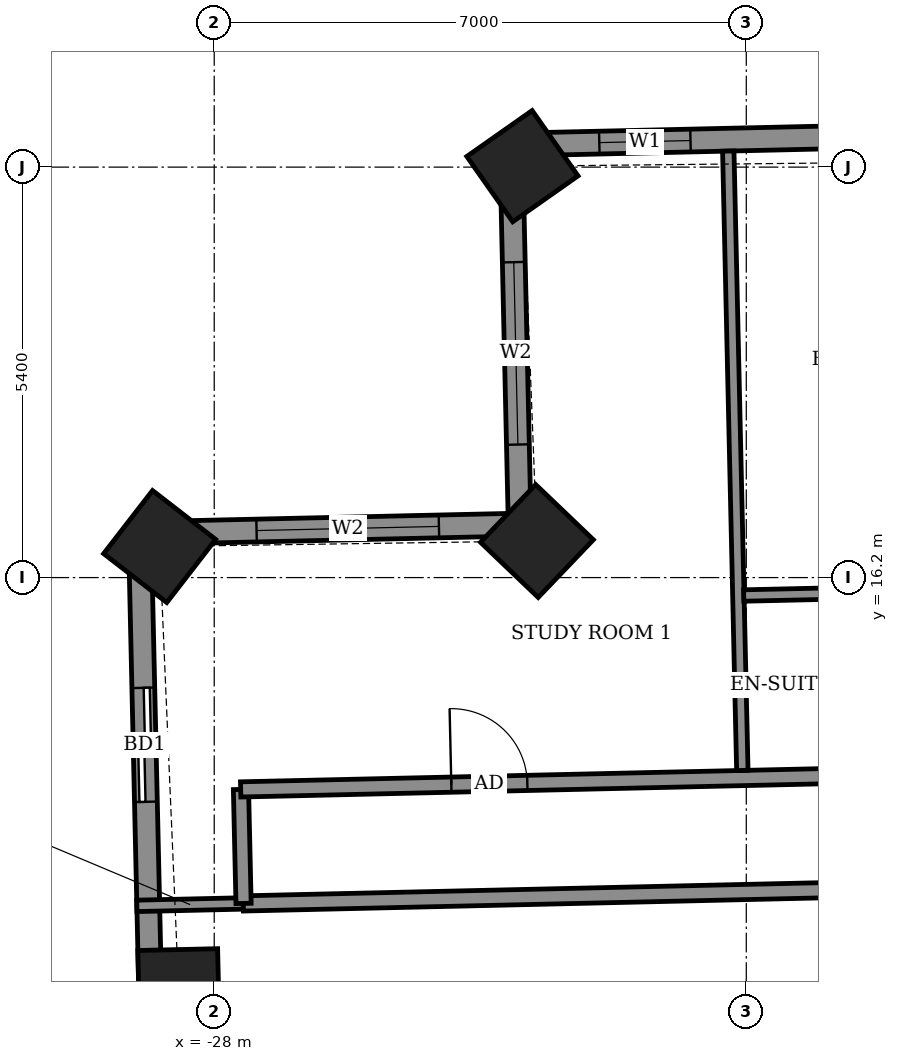
"""IFC4 building model, lengths in metres.
Left out: names, types, materials, properties, quantities, classifications, styles, units other than length and angle.
Written with IfcOpenShell. Run it as: python <this file> out.ifc"""

import sys

from ifc_helpers import new_model, si_unit, direction, frame, frame_2d, origin, origin_2d, place, context, subcontext, project, spatial, rectangle, extrude, element, fill, save


model = new_model("IFC4")
c1 = context("Model", 3, precision=1e-05, world=origin(), true_north=direction((0.0, 1.0)))
c2 = subcontext(c1, "Body", "Model", "MODEL_VIEW")
j1 = project(units=[si_unit("LENGTHUNIT", "METRE"), si_unit("PLANEANGLEUNIT", "RADIAN")], contexts=[c1])
p1 = place(None, origin())
s1 = spatial("IfcSite", under=j1, at=p1, CompositionType="ELEMENT")
p2 = place(p1, origin())
s2 = spatial("IfcBuilding", under=s1, at=p2, CompositionType="ELEMENT")
p3 = place(p2, frame((0.0, 0.0, 241.9)))
s3 = spatial("IfcBuildingStorey", under=s2, at=p3, CompositionType="ELEMENT", Elevation=241.9)
for number, where, z_axis, x_axis in (
    (1, (-23.945, 21.613, -0.55), (0.0, 0.0, 1.0), (-0.818, -0.575, 0.0)),
    (2, (-23.754, 16.681, -0.55), (0.0, 0.0, 1.0), (-0.691, -0.723, 0.0)),
    (3, (-28.718, 16.609, -0.55), (0.0, 0.0, 1.0), (-0.612, -0.791, 0.0)),
    (4, (-28.468, 10.781, -0.55), (0.0, 0.0, 1.0), (0.023, -1.0, 0.0)),
):
    element("IfcColumn", number, at=place(p3, frame(where, z_axis=z_axis, x_axis=x_axis)), inside=s3, PredefinedType="COLUMN", context=c2, shape_type="SweptSolid", body=[
        extrude(rectangle(XDim=1.05, YDim=1.05, at=origin_2d()), origin(), (0.0, 0.0, 1.0), 3.6),
    ])
p4 = place(p3, frame((20.403, 22.905, 0.0), z_axis=(0.0, 0.0, 1.0), x_axis=(-0.99974298964, -0.022670568288, 0.0)))
e5 = element("IfcWall", 5, at=p4, inside=s3, PredefinedType="SOLIDWALL", context=c2, shape_type="SweptSolid", body=[
    extrude(rectangle(XDim=44.509, YDim=0.3, at=frame_2d((22.254, 0.0))), origin(), (0.0, 0.0, 1.0), 2.5),
])
p5 = place(p4, frame((1.272, 0.0, 0.0)))
e6 = element("IfcOpeningElement", 6, at=p5, cuts=e5, PredefinedType="OPENING", context=c2, shape_type="SweptSolid", body=[
    extrude(rectangle(XDim=1.5, YDim=2.4, at=frame_2d((0.75, 1.2))), frame((0.0, 0.16, 0.0), z_axis=(0.0, -1.0, 0.0), x_axis=(1.0, 0.0, 0.0)), (0.0, 0.0, 1.0), 0.32),
])
p6 = place(p4, frame((4.501, 0.0, 0.0)))
e7 = element("IfcOpeningElement", 7, at=p6, cuts=e5, PredefinedType="OPENING", context=c2, shape_type="SweptSolid", body=[
    extrude(rectangle(XDim=1.5, YDim=2.4, at=frame_2d((0.75, 1.2))), frame((0.0, 0.16, 0.0), z_axis=(0.0, -1.0, 0.0), x_axis=(1.0, 0.0, 0.0)), (0.0, 0.0, 1.0), 0.32),
])
p7 = place(p4, frame((9.058, 0.0, 0.0)))
e8 = element("IfcOpeningElement", 8, at=p7, cuts=e5, PredefinedType="OPENING", context=c2, shape_type="SweptSolid", body=[
    extrude(rectangle(XDim=1.5, YDim=2.4, at=frame_2d((0.75, 1.2))), frame((0.0, 0.16, 0.0), z_axis=(0.0, -1.0, 0.0), x_axis=(1.0, 0.0, 0.0)), (0.0, 0.0, 1.0), 0.32),
])
p8 = place(p4, frame((12.46, 0.0, 0.0)))
e9 = element("IfcOpeningElement", 9, at=p8, cuts=e5, PredefinedType="OPENING", context=c2, shape_type="SweptSolid", body=[
    extrude(rectangle(XDim=1.5, YDim=2.4, at=frame_2d((0.75, 1.2))), frame((0.0, 0.16, 0.0), z_axis=(0.0, -1.0, 0.0), x_axis=(1.0, 0.0, 0.0)), (0.0, 0.0, 1.0), 0.32),
])
p9 = place(p4, frame((17.533, 0.0, 0.0)))
e10 = element("IfcOpeningElement", 10, at=p9, cuts=e5, PredefinedType="OPENING", context=c2, shape_type="SweptSolid", body=[
    extrude(rectangle(XDim=1.5, YDim=2.4, at=frame_2d((0.75, 1.2))), frame((0.0, 0.16, 0.0), z_axis=(0.0, -1.0, 0.0), x_axis=(1.0, 0.0, 0.0)), (0.0, 0.0, 1.0), 0.32),
])
p10 = place(p4, frame((22.993, 0.0, 0.0)))
e11 = element("IfcOpeningElement", 11, at=p10, cuts=e5, PredefinedType="OPENING", context=c2, shape_type="SweptSolid", body=[
    extrude(rectangle(XDim=1.2, YDim=2.4, at=frame_2d((0.6, 1.2))), frame((0.0, 0.16, 0.0), z_axis=(0.0, -1.0, 0.0), x_axis=(1.0, 0.0, 0.0)), (0.0, 0.0, 1.0), 0.32),
])
p11 = place(p4, frame((26.033, 0.0, 0.0)))
e12 = element("IfcOpeningElement", 12, at=p11, cuts=e5, PredefinedType="OPENING", context=c2, shape_type="SweptSolid", body=[
    extrude(rectangle(XDim=1.5, YDim=2.4, at=frame_2d((0.75, 1.2))), frame((0.0, 0.16, 0.0), z_axis=(0.0, -1.0, 0.0), x_axis=(1.0, 0.0, 0.0)), (0.0, 0.0, 1.0), 0.32),
])
p12 = place(p4, frame((30.827, 0.0, 0.0)))
e13 = element("IfcOpeningElement", 13, at=p12, cuts=e5, PredefinedType="OPENING", context=c2, shape_type="SweptSolid", body=[
    extrude(rectangle(XDim=1.5, YDim=2.4, at=frame_2d((0.75, 1.2))), frame((0.0, 0.16, 0.0), z_axis=(0.0, -1.0, 0.0), x_axis=(1.0, 0.0, 0.0)), (0.0, 0.0, 1.0), 0.32),
])
p13 = place(p4, frame((34.286, 0.0, 0.0)))
e14 = element("IfcOpeningElement", 14, at=p13, cuts=e5, PredefinedType="OPENING", context=c2, shape_type="SweptSolid", body=[
    extrude(rectangle(XDim=1.5, YDim=2.4, at=frame_2d((0.75, 1.2))), frame((0.0, 0.16, 0.0), z_axis=(0.0, -1.0, 0.0), x_axis=(1.0, 0.0, 0.0)), (0.0, 0.0, 1.0), 0.32),
])
p14 = place(p4, frame((38.811, 0.0, 0.0)))
e15 = element("IfcOpeningElement", 15, at=p14, cuts=e5, PredefinedType="OPENING", context=c2, shape_type="SweptSolid", body=[
    extrude(rectangle(XDim=1.5, YDim=2.4, at=frame_2d((0.75, 1.2))), frame((0.0, 0.16, 0.0), z_axis=(0.0, -1.0, 0.0), x_axis=(1.0, 0.0, 0.0)), (0.0, 0.0, 1.0), 0.32),
])
p15 = place(p4, frame((42.148, 0.0, 0.9)))
e16 = element("IfcOpeningElement", 16, at=p15, cuts=e5, PredefinedType="OPENING", context=c2, shape_type="SweptSolid", body=[
    extrude(rectangle(XDim=1.2, YDim=1.5, at=frame_2d((0.6, 0.75))), frame((0.0, 0.16, 0.0), z_axis=(0.0, -1.0, 0.0), x_axis=(1.0, 0.0, 0.0)), (0.0, 0.0, 1.0), 0.32),
])
p16 = place(p3, frame((-24.094, 21.896, 0.0), z_axis=(0.0, 0.0, 1.0), x_axis=(0.022606059803, -0.999744450377, 0.0)))
e17 = element("IfcWall", 17, at=p16, inside=s3, PredefinedType="SOLIDWALL", context=c2, shape_type="SweptSolid", body=[
    extrude(rectangle(XDim=5.0, YDim=0.3, at=frame_2d((2.5, 0.0))), origin(), (0.0, 0.0, 1.0), 2.55),
])
p17 = place(p16, frame((1.547, 0.0, 0.9)))
e18 = element("IfcOpeningElement", 18, at=p17, cuts=e17, PredefinedType="OPENING", context=c2, shape_type="SweptSolid", body=[
    extrude(rectangle(XDim=2.4, YDim=1.5, at=frame_2d((1.2, 0.75))), frame((0.0, 0.16, 0.0), z_axis=(0.0, -1.0, 0.0), x_axis=(1.0, 0.0, 0.0)), (0.0, 0.0, 1.0), 0.32),
])
p18 = place(p3, frame((-23.981, 16.897, 0.0), z_axis=(0.0, 0.0, 1.0), x_axis=(-0.999744350543, -0.022610474516, 0.0)))
e19 = element("IfcWall", 19, at=p18, inside=s3, PredefinedType="SOLIDWALL", context=c2, shape_type="SweptSolid", body=[
    extrude(rectangle(XDim=4.999, YDim=0.3, at=frame_2d((2.5, 0.0))), origin(), (0.0, 0.0, 1.0), 2.55),
])
p19 = place(p18, frame((1.063, 0.0, 0.9)))
e20 = element("IfcOpeningElement", 20, at=p19, cuts=e19, PredefinedType="OPENING", context=c2, shape_type="SweptSolid", body=[
    extrude(rectangle(XDim=2.4, YDim=1.5, at=frame_2d((1.2, 0.75))), frame((0.0, 0.16, 0.0), z_axis=(0.0, -1.0, 0.0), x_axis=(1.0, 0.0, 0.0)), (0.0, 0.0, 1.0), 0.32),
])
p20 = place(p3, frame((-28.979, 16.784, 0.0), z_axis=(0.0, 0.0, 1.0), x_axis=(0.022685159264, -0.999742658662, 0.0)))
e21 = element("IfcWall", 21, at=p20, inside=s3, PredefinedType="SOLIDWALL", context=c2, shape_type="SweptSolid", body=[
    extrude(rectangle(XDim=12.699, YDim=0.3, at=frame_2d((6.35, 0.0))), origin(), (0.0, 0.0, 1.0), 2.55),
])
p21 = place(p20, frame((2.035, 0.0, 0.0)))
e22 = element("IfcOpeningElement", 22, at=p21, cuts=e21, PredefinedType="OPENING", context=c2, shape_type="SweptSolid", body=[
    extrude(rectangle(XDim=1.5, YDim=2.4, at=frame_2d((0.75, 1.2))), frame((0.0, 0.16, 0.0), z_axis=(0.0, -1.0, 0.0), x_axis=(1.0, 0.0, 0.0)), (0.0, 0.0, 1.0), 0.32),
])
p22 = place(p20, frame((7.894, 0.0, 0.9)))
e23 = element("IfcOpeningElement", 23, at=p22, cuts=e21, PredefinedType="OPENING", context=c2, shape_type="SweptSolid", body=[
    extrude(rectangle(XDim=2.4, YDim=1.5, at=frame_2d((1.2, 0.75))), frame((0.0, 0.16, 0.0), z_axis=(0.0, -1.0, 0.0), x_axis=(1.0, 0.0, 0.0)), (0.0, 0.0, 1.0), 0.32),
])
p23 = place(p3, frame((-29.018, 11.881, 0.0), z_axis=(0.0, 0.0, 1.0), x_axis=(0.999740667531, 0.022772739949, 0.0)))
e24 = element("IfcWall", 24, at=p23, inside=s3, PredefinedType="PARTITIONING", context=c2, shape_type="SweptSolid", body=[
    extrude(rectangle(XDim=1.404, YDim=0.15, at=frame_2d((0.702, 0.0))), origin(), (0.0, 0.0, 1.0), 2.55),
])
p24 = place(p3, frame((-27.618, 11.913, 0.0), z_axis=(0.0, 0.0, 1.0), x_axis=(0.999741483035, 0.022736910479, 0.0)))
e25 = element("IfcWall", 25, at=p24, inside=s3, PredefinedType="PARTITIONING", context=c2, shape_type="SweptSolid", body=[
    extrude(rectangle(XDim=10.373, YDim=0.2, at=frame_2d((5.186, 0.0))), origin(), (0.0, 0.0, 1.0), 3.05),
])
p25 = place(p3, frame((-27.614, 11.913, 0.0), z_axis=(0.0, 0.0, 1.0), x_axis=(-0.022617910375, 0.999744182344, 0.0)))
e26 = element("IfcWall", 26, at=p25, inside=s3, PredefinedType="PARTITIONING", context=c2, shape_type="SweptSolid", body=[
    extrude(rectangle(XDim=1.5, YDim=0.2, at=frame_2d((0.75, 0.0))), origin(), (0.0, 0.0, 1.0), 3.05),
])
p26 = place(p3, frame((-27.652, 13.413, 0.0), z_axis=(0.0, 0.0, 1.0), x_axis=(0.999742864992, 0.022676064408, 0.0)))
e27 = element("IfcWall", 27, at=p26, inside=s3, PredefinedType="PARTITIONING", context=c2, shape_type="SweptSolid", body=[
    extrude(rectangle(XDim=50.882, YDim=0.2, at=frame_2d((25.441, 0.0))), origin(), (0.0, 0.0, 1.0), 3.05),
])
p27 = place(p26, frame((47.801, 0.0, 0.0)))
e28 = element("IfcOpeningElement", 28, at=p27, cuts=e27, PredefinedType="OPENING", context=c2, shape_type="SweptSolid", body=[
    extrude(rectangle(XDim=1.0, YDim=2.1, at=frame_2d((0.5, 1.05))), frame((0.0, 0.11, 0.0), z_axis=(0.0, -1.0, 0.0), x_axis=(1.0, 0.0, 0.0)), (0.0, 0.0, 1.0), 0.22),
])
p28 = place(p26, frame((43.425, 0.0, 0.0)))
e29 = element("IfcOpeningElement", 29, at=p28, cuts=e27, PredefinedType="OPENING", context=c2, shape_type="SweptSolid", body=[
    extrude(rectangle(XDim=0.9, YDim=2.1, at=frame_2d((0.45, 1.05))), frame((0.0, 0.11, 0.0), z_axis=(0.0, -1.0, 0.0), x_axis=(1.0, 0.0, 0.0)), (0.0, 0.0, 1.0), 0.22),
])
p29 = place(p26, frame((36.8, 0.0, 0.0)))
e30 = element("IfcOpeningElement", 30, at=p29, cuts=e27, PredefinedType="OPENING", context=c2, shape_type="SweptSolid", body=[
    extrude(rectangle(XDim=0.9, YDim=2.1, at=frame_2d((0.45, 1.05))), frame((0.0, 0.11, 0.0), z_axis=(0.0, -1.0, 0.0), x_axis=(1.0, 0.0, 0.0)), (0.0, 0.0, 1.0), 0.22),
])
p30 = place(p26, frame((34.975, 0.0, 0.0)))
e31 = element("IfcOpeningElement", 31, at=p30, cuts=e27, PredefinedType="OPENING", context=c2, shape_type="SweptSolid", body=[
    extrude(rectangle(XDim=0.9, YDim=2.1, at=frame_2d((0.45, 1.05))), frame((0.0, 0.11, 0.0), z_axis=(0.0, -1.0, 0.0), x_axis=(1.0, 0.0, 0.0)), (0.0, 0.0, 1.0), 0.22),
])
p31 = place(p26, frame((28.325, 0.0, 0.0)))
e32 = element("IfcOpeningElement", 32, at=p31, cuts=e27, PredefinedType="OPENING", context=c2, shape_type="SweptSolid", body=[
    extrude(rectangle(XDim=0.9, YDim=2.1, at=frame_2d((0.45, 1.05))), frame((0.0, 0.11, 0.0), z_axis=(0.0, -1.0, 0.0), x_axis=(1.0, 0.0, 0.0)), (0.0, 0.0, 1.0), 0.22),
])
p32 = place(p26, frame((26.475, 0.0, 0.0)))
e33 = element("IfcOpeningElement", 33, at=p32, cuts=e27, PredefinedType="OPENING", context=c2, shape_type="SweptSolid", body=[
    extrude(rectangle(XDim=0.9, YDim=2.1, at=frame_2d((0.45, 1.05))), frame((0.0, 0.11, 0.0), z_axis=(0.0, -1.0, 0.0), x_axis=(1.0, 0.0, 0.0)), (0.0, 0.0, 1.0), 0.22),
])
p33 = place(p26, frame((19.825, 0.0, 0.0)))
e34 = element("IfcOpeningElement", 34, at=p33, cuts=e27, PredefinedType="OPENING", context=c2, shape_type="SweptSolid", body=[
    extrude(rectangle(XDim=0.9, YDim=2.1, at=frame_2d((0.45, 1.05))), frame((0.0, 0.11, 0.0), z_axis=(0.0, -1.0, 0.0), x_axis=(1.0, 0.0, 0.0)), (0.0, 0.0, 1.0), 0.22),
])
p34 = place(p26, frame((17.975, 0.0, 0.0)))
e35 = element("IfcOpeningElement", 35, at=p34, cuts=e27, PredefinedType="OPENING", context=c2, shape_type="SweptSolid", body=[
    extrude(rectangle(XDim=0.9, YDim=2.1, at=frame_2d((0.45, 1.05))), frame((0.0, 0.11, 0.0), z_axis=(0.0, -1.0, 0.0), x_axis=(1.0, 0.0, 0.0)), (0.0, 0.0, 1.0), 0.22),
])
p35 = place(p26, frame((11.325, 0.0, 0.0)))
e36 = element("IfcOpeningElement", 36, at=p35, cuts=e27, PredefinedType="OPENING", context=c2, shape_type="SweptSolid", body=[
    extrude(rectangle(XDim=0.9, YDim=2.1, at=frame_2d((0.45, 1.05))), frame((0.0, 0.11, 0.0), z_axis=(0.0, -1.0, 0.0), x_axis=(1.0, 0.0, 0.0)), (0.0, 0.0, 1.0), 0.22),
])
p36 = place(p26, frame((9.475, 0.0, 0.0)))
e37 = element("IfcOpeningElement", 37, at=p36, cuts=e27, PredefinedType="OPENING", context=c2, shape_type="SweptSolid", body=[
    extrude(rectangle(XDim=0.9, YDim=2.1, at=frame_2d((0.45, 1.05))), frame((0.0, 0.11, 0.0), z_axis=(0.0, -1.0, 0.0), x_axis=(1.0, 0.0, 0.0)), (0.0, 0.0, 1.0), 0.22),
])
p37 = place(p26, frame((2.772, 0.0, 0.0)))
e38 = element("IfcOpeningElement", 38, at=p37, cuts=e27, PredefinedType="OPENING", context=c2, shape_type="SweptSolid", body=[
    extrude(rectangle(XDim=1.0, YDim=2.1, at=frame_2d((0.5, 1.05))), frame((0.0, 0.11, 0.0), z_axis=(0.0, -1.0, 0.0), x_axis=(1.0, 0.0, 0.0)), (0.0, 0.0, 1.0), 0.22),
])
p38 = place(p3, frame((-21.052, 13.663, 0.0), z_axis=(0.0, 0.0, 1.0), x_axis=(-0.022706435224, 0.999742175663, 0.0)))
e39 = element("IfcWall", 39, at=p38, inside=s3, PredefinedType="PARTITIONING", context=c2, shape_type="SweptSolid", body=[
    extrude(rectangle(XDim=8.15, YDim=0.15, at=frame_2d((4.075, 0.0))), origin(), (0.0, 0.0, 1.0), 2.5),
])
p39 = place(p3, frame((-21.034, 15.964, 0.0), z_axis=(0.0, 0.0, 1.0), x_axis=(0.999749954681, 0.022361308448, 0.0)))
e40 = element("IfcWall", 40, at=p39, inside=s3, PredefinedType="PARTITIONING", context=c2, shape_type="SweptSolid", body=[
    extrude(rectangle(XDim=2.325, YDim=0.15, at=frame_2d((1.163, 0.0))), origin(), (0.0, 0.0, 1.0), 3.05),
])
p40 = place(p15, origin())
e41 = element("IfcWindow", 41, at=p40, inside=s3, PartitioningType="SINGLE_PANEL", PredefinedType="WINDOW", context=c2, shape_type="SweptSolid", body=[
    extrude(rectangle(XDim=1.2, YDim=1.5, at=frame_2d((0.6, 0.75))), frame((0.0, 0.03, 0.0), z_axis=(0.0, -1.0, 0.0), x_axis=(1.0, 0.0, 0.0)), (0.0, 0.0, 1.0), 0.06),
])
fill(e16, e41)
p41 = place(p17, origin())
e42 = element("IfcWindow", 42, at=p41, inside=s3, PartitioningType="DOUBLE_PANEL_VERTICAL", PredefinedType="WINDOW", context=c2, shape_type="SweptSolid", body=[
    extrude(rectangle(XDim=2.4, YDim=1.5, at=frame_2d((1.2, 0.75))), frame((0.0, 0.03, 0.0), z_axis=(0.0, -1.0, 0.0), x_axis=(1.0, 0.0, 0.0)), (0.0, 0.0, 1.0), 0.06),
])
fill(e18, e42)
p42 = place(p19, origin())
e43 = element("IfcWindow", 43, at=p42, inside=s3, PartitioningType="DOUBLE_PANEL_VERTICAL", PredefinedType="WINDOW", context=c2, shape_type="SweptSolid", body=[
    extrude(rectangle(XDim=2.4, YDim=1.5, at=frame_2d((1.2, 0.75))), frame((0.0, 0.03, 0.0), z_axis=(0.0, -1.0, 0.0), x_axis=(1.0, 0.0, 0.0)), (0.0, 0.0, 1.0), 0.06),
])
fill(e20, e43)
p43 = place(p21, origin())
e44 = element("IfcDoor", 44, at=p43, inside=s3, OperationType="SLIDING_TO_LEFT", PredefinedType="DOOR", context=c2, shape_type="SweptSolid", body=[
    extrude(rectangle(XDim=1.5, YDim=2.4, at=frame_2d((0.75, 1.2))), frame((0.0, 0.025, 0.0), z_axis=(0.0, -1.0, 0.0), x_axis=(1.0, 0.0, 0.0)), (0.0, 0.0, 1.0), 0.05),
])
fill(e22, e44)
p44 = place(p37, origin())
e45 = element("IfcDoor", 45, at=p44, inside=s3, OperationType="SINGLE_SWING_RIGHT", PredefinedType="DOOR", context=c2, shape_type="SweptSolid", body=[
    extrude(rectangle(XDim=1.0, YDim=2.1, at=frame_2d((0.5, 1.05))), frame((0.0, 0.025, 0.0), z_axis=(0.0, -1.0, 0.0), x_axis=(1.0, 0.0, 0.0)), (0.0, 0.0, 1.0), 0.05),
])
fill(e38, e45)
save(model, sys.argv[1])
